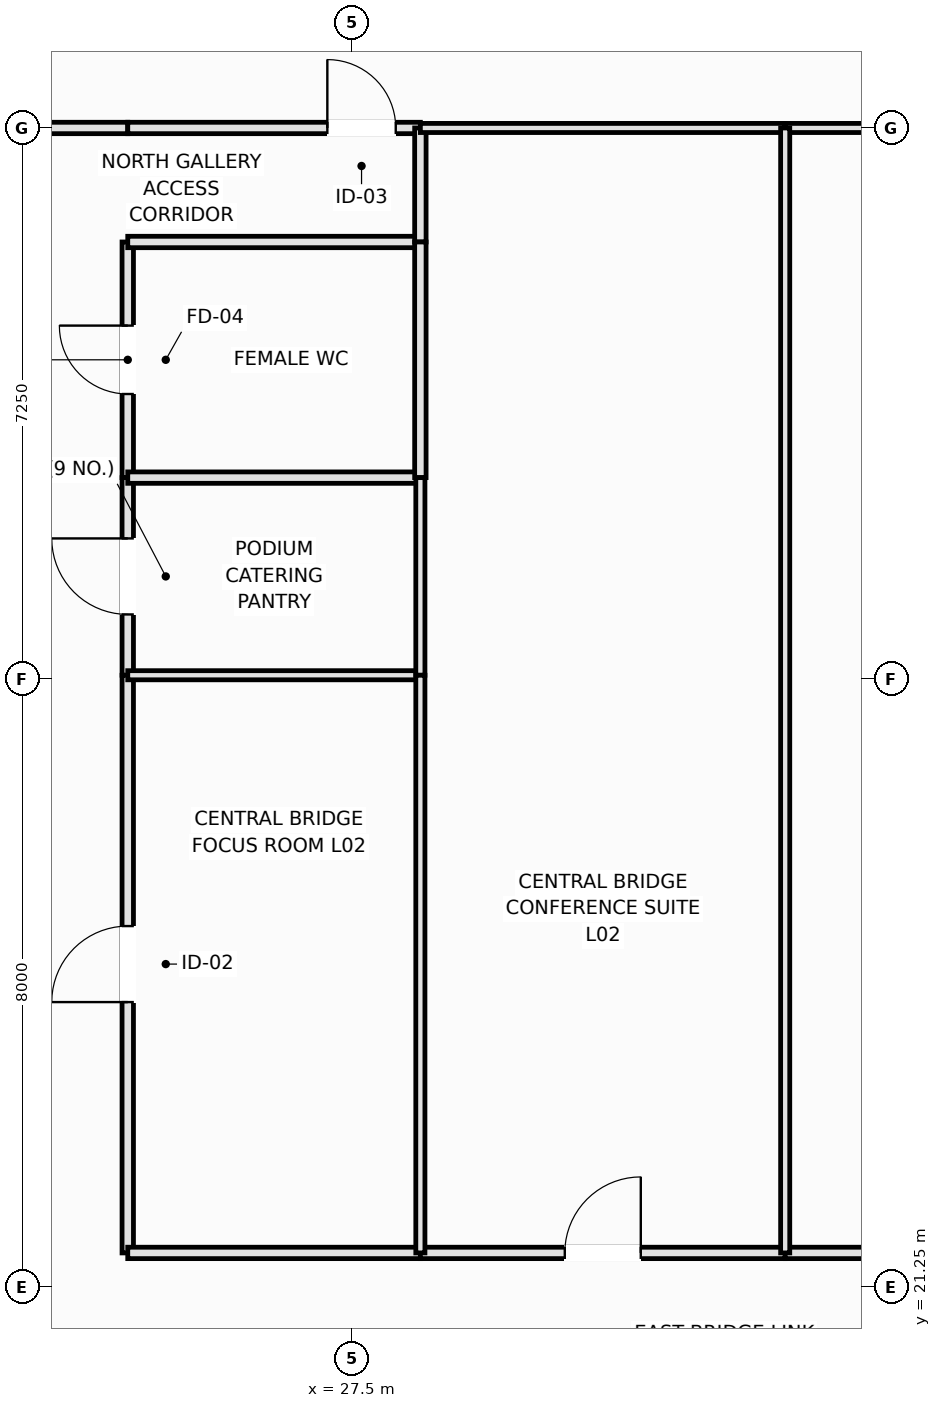
"""IFC4 building model, lengths in metres.
Left out: names, types, materials, properties, quantities, classifications, styles, units other than length and angle.
Written with IfcOpenShell. Run it as: python <this file> out.ifc"""

import sys

from ifc_helpers import new_model, si_unit, direction, frame, frame_2d, origin, place, context, subcontext, project, spatial, rectangle, extrude, element, fill, save


model = new_model("IFC4")
c1 = context("Model", 3, precision=1e-05, world=origin(), true_north=direction((0.0, 1.0)))
c2 = subcontext(c1, "Body", "Model", "MODEL_VIEW")
j1 = project(units=[si_unit("LENGTHUNIT", "METRE"), si_unit("PLANEANGLEUNIT", "RADIAN")], contexts=[c1])
p1 = place(None, origin())
s1 = spatial("IfcSite", under=j1, at=p1, CompositionType="ELEMENT")
p2 = place(p1, origin())
s2 = spatial("IfcBuilding", under=s1, at=p2, CompositionType="ELEMENT")
p3 = place(p2, frame((0.0, 0.0, 10.8)))
s3 = spatial("IfcBuildingStorey", under=s2, at=p3, CompositionType="ELEMENT", Elevation=10.8)
p4 = place(p3, frame((22.55, 36.5, 0.0), z_axis=(0.0, 0.0, 1.0), x_axis=(1.0, 0.0, 0.0)))
e1 = element("IfcWall", 1, at=p4, inside=s3, PredefinedType="PARTITIONING", context=c2, shape_type="SweptSolid", body=[
    extrude(rectangle(XDim=2.0, YDim=0.15, at=frame_2d((1.0, 0.0))), origin(), (0.0, 0.0, 1.0), 4.6),
])
p5 = place(p3, frame((24.55, 31.9, 0.0), z_axis=(0.0, 0.0, 1.0), x_axis=(0.0, 1.0, 0.0)))
e2 = element("IfcWall", 2, at=p5, inside=s3, PredefinedType="PLUMBINGWALL", context=c2, shape_type="SweptSolid", body=[
    extrude(rectangle(XDim=3.1, YDim=0.15, at=frame_2d((1.55, 0.0))), origin(), (0.0, 0.0, 1.0), 4.6),
])
p6 = place(p5, frame((1.1, 0.0, 0.0)))
e3 = element("IfcOpeningElement", 3, at=p6, cuts=e2, PredefinedType="OPENING", context=c2, shape_type="SweptSolid", body=[
    extrude(rectangle(XDim=0.9, YDim=2.1, at=frame_2d((0.45, 1.05))), frame((0.0, 0.085, 0.0), z_axis=(0.0, -1.0, 0.0), x_axis=(1.0, 0.0, 0.0)), (0.0, 0.0, 1.0), 0.17),
])
p7 = place(p3, frame((24.55, 29.3, 0.0), z_axis=(0.0, 0.0, 1.0), x_axis=(0.0, 1.0, 0.0)))
e4 = element("IfcWall", 4, at=p7, inside=s3, PredefinedType="PARTITIONING", context=c2, shape_type="SweptSolid", body=[
    extrude(rectangle(XDim=2.6, YDim=0.15, at=frame_2d((1.3, 0.0))), origin(), (0.0, 0.0, 1.0), 4.6),
])
p8 = place(p7, frame((0.8, 0.0, 0.0)))
e5 = element("IfcOpeningElement", 5, at=p8, cuts=e4, PredefinedType="OPENING", context=c2, shape_type="SweptSolid", body=[
    extrude(rectangle(XDim=1.0, YDim=2.15, at=frame_2d((0.5, 1.075))), frame((0.0, 0.085, 0.0), z_axis=(0.0, -1.0, 0.0), x_axis=(1.0, 0.0, 0.0)), (0.0, 0.0, 1.0), 0.17),
])
p9 = place(p3, frame((24.55, 21.7, 0.0), z_axis=(0.0, 0.0, 1.0), x_axis=(0.0, 1.0, 0.0)))
e6 = element("IfcWall", 6, at=p9, inside=s3, PredefinedType="PARTITIONING", context=c2, shape_type="SweptSolid", body=[
    extrude(rectangle(XDim=7.6, YDim=0.15, at=frame_2d((3.8, 0.0))), origin(), (0.0, 0.0, 1.0), 4.6),
])
p10 = place(p9, frame((3.3, 0.0, 0.0)))
e7 = element("IfcOpeningElement", 7, at=p10, cuts=e6, PredefinedType="OPENING", context=c2, shape_type="SweptSolid", body=[
    extrude(rectangle(XDim=1.0, YDim=2.15, at=frame_2d((0.5, 1.075))), frame((0.0, 0.085, 0.0), z_axis=(0.0, -1.0, 0.0), x_axis=(1.0, 0.0, 0.0)), (0.0, 0.0, 1.0), 0.17),
])
p11 = place(p3, frame((24.55, 36.5, 0.0), z_axis=(0.0, 0.0, 1.0), x_axis=(1.0, 0.0, 0.0)))
e8 = element("IfcWall", 8, at=p11, inside=s3, PredefinedType="PARTITIONING", context=c2, shape_type="SweptSolid", body=[
    extrude(rectangle(XDim=3.85, YDim=0.15, at=frame_2d((1.925, 0.0))), origin(), (0.0, 0.0, 1.0), 4.6),
])
p12 = place(p11, frame((2.626, 0.0, 0.0)))
e9 = element("IfcOpeningElement", 9, at=p12, cuts=e8, PredefinedType="OPENING", context=c2, shape_type="SweptSolid", body=[
    extrude(rectangle(XDim=0.9, YDim=2.1, at=frame_2d((0.45, 1.05))), frame((0.0, 0.085, 0.0), z_axis=(0.0, -1.0, 0.0), x_axis=(1.0, 0.0, 0.0)), (0.0, 0.0, 1.0), 0.17),
])
p13 = place(p3, frame((24.55, 35.0, 0.0), z_axis=(0.0, 0.0, 1.0), x_axis=(1.0, 0.0, 0.0)))
e10 = element("IfcWall", 10, at=p13, inside=s3, PredefinedType="PLUMBINGWALL", context=c2, shape_type="SweptSolid", body=[
    extrude(rectangle(XDim=3.85, YDim=0.15, at=frame_2d((1.925, 0.0))), origin(), (0.0, 0.0, 1.0), 4.6),
])
p14 = place(p3, frame((28.4, 35.0, 0.0), z_axis=(0.0, 0.0, 1.0), x_axis=(0.0, 1.0, 0.0)))
e11 = element("IfcWall", 11, at=p14, inside=s3, PredefinedType="PARTITIONING", context=c2, shape_type="SweptSolid", body=[
    extrude(rectangle(XDim=1.5, YDim=0.15, at=frame_2d((0.75, 0.0))), origin(), (0.0, 0.0, 1.0), 4.6),
])
p15 = place(p3, frame((24.55, 21.7, 0.0), z_axis=(0.0, 0.0, 1.0), x_axis=(1.0, 0.0, 0.0)))
e12 = element("IfcWall", 12, at=p15, inside=s3, PredefinedType="PARTITIONING", context=c2, shape_type="SweptSolid", body=[
    extrude(rectangle(XDim=3.85, YDim=0.15, at=frame_2d((1.925, 0.0))), origin(), (0.0, 0.0, 1.0), 4.6),
])
p16 = place(p3, frame((28.4, 21.7, 0.0), z_axis=(0.0, 0.0, 1.0), x_axis=(1.0, 0.0, 0.0)))
e13 = element("IfcWall", 13, at=p16, inside=s3, PredefinedType="PARTITIONING", context=c2, shape_type="SweptSolid", body=[
    extrude(rectangle(XDim=4.8, YDim=0.15, at=frame_2d((2.4, 0.0))), origin(), (0.0, 0.0, 1.0), 4.6),
])
p17 = place(p16, frame((1.9, 0.0, 0.0)))
e14 = element("IfcOpeningElement", 14, at=p17, cuts=e13, PredefinedType="OPENING", context=c2, shape_type="SweptSolid", body=[
    extrude(rectangle(XDim=1.0, YDim=2.15, at=frame_2d((0.5, 1.075))), frame((0.0, 0.085, 0.0), z_axis=(0.0, -1.0, 0.0), x_axis=(1.0, 0.0, 0.0)), (0.0, 0.0, 1.0), 0.17),
])
p18 = place(p3, frame((33.2, 21.7, 0.0), z_axis=(0.0, 0.0, 1.0), x_axis=(1.0, 0.0, 0.0)))
e15 = element("IfcWall", 15, at=p18, inside=s3, PredefinedType="PARTITIONING", context=c2, shape_type="SweptSolid", body=[
    extrude(rectangle(XDim=5.0, YDim=0.15, at=frame_2d((2.5, 0.0))), origin(), (0.0, 0.0, 1.0), 4.6),
])
p19 = place(p18, frame((2.0, 0.0, 0.0)))
e16 = element("IfcOpeningElement", 16, at=p19, cuts=e15, PredefinedType="OPENING", context=c2, shape_type="SweptSolid", body=[
    extrude(rectangle(XDim=1.0, YDim=2.15, at=frame_2d((0.5, 1.075))), frame((0.0, 0.085, 0.0), z_axis=(0.0, -1.0, 0.0), x_axis=(1.0, 0.0, 0.0)), (0.0, 0.0, 1.0), 0.17),
])
p20 = place(p3, frame((28.4, 36.5, 0.0), z_axis=(0.0, 0.0, 1.0), x_axis=(1.0, 0.0, 0.0)))
e17 = element("IfcWall", 17, at=p20, inside=s3, PredefinedType="PARTITIONING", context=c2, shape_type="SweptSolid", body=[
    extrude(rectangle(XDim=4.8, YDim=0.12, at=frame_2d((2.4, 0.0))), origin(), (0.0, 0.0, 1.0), 4.6),
])
p21 = place(p3, frame((33.2, 36.5, 0.0), z_axis=(0.0, 0.0, 1.0), x_axis=(1.0, 0.0, 0.0)))
e18 = element("IfcWall", 18, at=p21, inside=s3, PredefinedType="PARTITIONING", context=c2, shape_type="SweptSolid", body=[
    extrude(rectangle(XDim=5.0, YDim=0.12, at=frame_2d((2.5, 0.0))), origin(), (0.0, 0.0, 1.0), 4.6),
])
p22 = place(p3, frame((24.55, 31.9, 0.0), z_axis=(0.0, 0.0, 1.0), x_axis=(1.0, 0.0, 0.0)))
e19 = element("IfcWall", 19, at=p22, inside=s3, PredefinedType="PLUMBINGWALL", context=c2, shape_type="SweptSolid", body=[
    extrude(rectangle(XDim=3.85, YDim=0.15, at=frame_2d((1.925, 0.0))), origin(), (0.0, 0.0, 1.0), 3.8),
])
p23 = place(p3, frame((28.4, 31.9, 0.0), z_axis=(0.0, 0.0, 1.0), x_axis=(0.0, 1.0, 0.0)))
e20 = element("IfcWall", 20, at=p23, inside=s3, PredefinedType="PLUMBINGWALL", context=c2, shape_type="SweptSolid", body=[
    extrude(rectangle(XDim=3.1, YDim=0.15, at=frame_2d((1.55, 0.0))), origin(), (0.0, 0.0, 1.0), 4.6),
])
p24 = place(p3, frame((24.55, 29.3, 0.0), z_axis=(0.0, 0.0, 1.0), x_axis=(1.0, 0.0, 0.0)))
e21 = element("IfcWall", 21, at=p24, inside=s3, PredefinedType="PARTITIONING", context=c2, shape_type="SweptSolid", body=[
    extrude(rectangle(XDim=3.85, YDim=0.12, at=frame_2d((1.925, 0.0))), origin(), (0.0, 0.0, 1.0), 4.6),
])
p25 = place(p3, frame((28.4, 29.3, 0.0), z_axis=(0.0, 0.0, 1.0), x_axis=(0.0, 1.0, 0.0)))
e22 = element("IfcWall", 22, at=p25, inside=s3, PredefinedType="PARTITIONING", context=c2, shape_type="SweptSolid", body=[
    extrude(rectangle(XDim=2.6, YDim=0.12, at=frame_2d((1.3, 0.0))), origin(), (0.0, 0.0, 1.0), 4.6),
])
p26 = place(p3, frame((28.4, 21.7, 0.0), z_axis=(0.0, 0.0, 1.0), x_axis=(0.0, 1.0, 0.0)))
e23 = element("IfcWall", 23, at=p26, inside=s3, PredefinedType="PARTITIONING", context=c2, shape_type="SweptSolid", body=[
    extrude(rectangle(XDim=7.6, YDim=0.12, at=frame_2d((3.8, 0.0))), origin(), (0.0, 0.0, 1.0), 4.6),
])
p27 = place(p3, frame((33.2, 21.7, 0.0), z_axis=(0.0, 0.0, 1.0), x_axis=(0.0, 1.0, 0.0)))
e24 = element("IfcWall", 24, at=p27, inside=s3, PredefinedType="PARTITIONING", context=c2, shape_type="SweptSolid", body=[
    extrude(rectangle(XDim=14.8, YDim=0.12, at=frame_2d((7.4, 0.0))), origin(), (0.0, 0.0, 1.0), 4.6),
])
p28 = place(p6, origin())
e25 = element("IfcDoor", 25, at=p28, inside=s3, OperationType="SINGLE_SWING_RIGHT", PredefinedType="DOOR", context=c2, shape_type="SweptSolid", body=[
    extrude(rectangle(XDim=0.9, YDim=2.1, at=frame_2d((0.45, 1.05))), frame((0.0, 0.025, 0.0), z_axis=(0.0, -1.0, 0.0), x_axis=(1.0, 0.0, 0.0)), (0.0, 0.0, 1.0), 0.05),
])
fill(e3, e25)
p29 = place(p8, origin())
e26 = element("IfcDoor", 26, at=p29, inside=s3, OperationType="SINGLE_SWING_RIGHT", PredefinedType="DOOR", context=c2, shape_type="SweptSolid", body=[
    extrude(rectangle(XDim=1.0, YDim=2.15, at=frame_2d((0.5, 1.075))), frame((0.0, 0.025, 0.0), z_axis=(0.0, -1.0, 0.0), x_axis=(1.0, 0.0, 0.0)), (0.0, 0.0, 1.0), 0.05),
])
fill(e5, e26)
p30 = place(p10, origin())
e27 = element("IfcDoor", 27, at=p30, inside=s3, OperationType="SINGLE_SWING_LEFT", PredefinedType="DOOR", context=c2, shape_type="SweptSolid", body=[
    extrude(rectangle(XDim=1.0, YDim=2.15, at=frame_2d((0.5, 1.075))), frame((0.0, 0.025, 0.0), z_axis=(0.0, -1.0, 0.0), x_axis=(1.0, 0.0, 0.0)), (0.0, 0.0, 1.0), 0.05),
])
fill(e7, e27)
p31 = place(p12, origin())
e28 = element("IfcDoor", 28, at=p31, inside=s3, OperationType="SINGLE_SWING_LEFT", PredefinedType="DOOR", context=c2, shape_type="SweptSolid", body=[
    extrude(rectangle(XDim=0.9, YDim=2.1, at=frame_2d((0.45, 1.05))), frame((0.0, 0.025, 0.0), z_axis=(0.0, -1.0, 0.0), x_axis=(1.0, 0.0, 0.0)), (0.0, 0.0, 1.0), 0.05),
])
fill(e9, e28)
p32 = place(p17, origin())
e29 = element("IfcDoor", 29, at=p32, inside=s3, OperationType="SINGLE_SWING_RIGHT", PredefinedType="DOOR", context=c2, shape_type="SweptSolid", body=[
    extrude(rectangle(XDim=1.0, YDim=2.15, at=frame_2d((0.5, 1.075))), frame((0.0, 0.025, 0.0), z_axis=(0.0, -1.0, 0.0), x_axis=(1.0, 0.0, 0.0)), (0.0, 0.0, 1.0), 0.05),
])
fill(e14, e29)
save(model, sys.argv[1])
